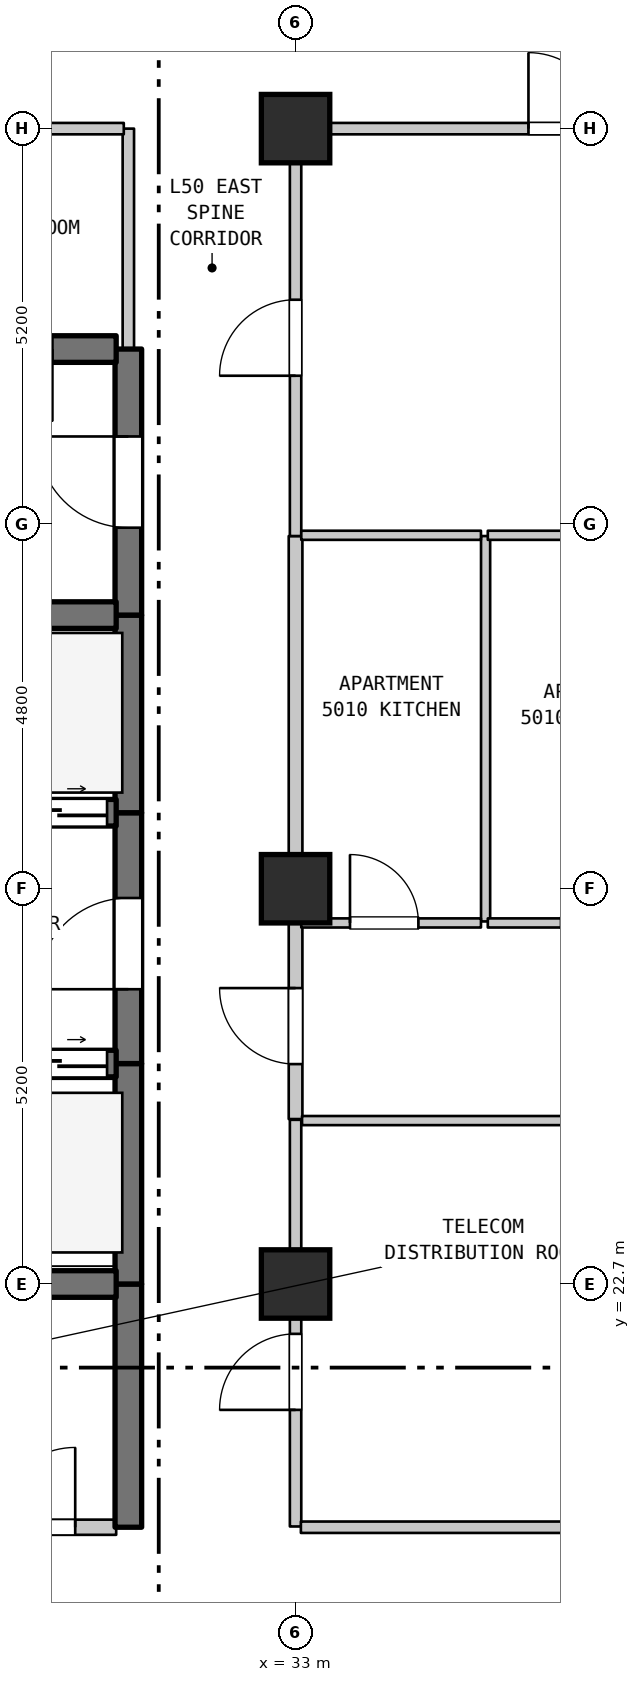
"""IFC4 building model, lengths in metres.
Left out: names, types, materials, properties, quantities, classifications, styles, units other than length and angle.
Written with IfcOpenShell. Run it as: python <this file> out.ifc"""

import sys

from ifc_helpers import new_model, si_unit, direction, frame, frame_2d, origin, origin_2d, place, context, subcontext, project, spatial, rectangle, extrude, element, fill, save


model = new_model("IFC4")
c1 = context("Model", 3, precision=1e-05, world=origin(), true_north=direction((0.0, 1.0)))
c2 = subcontext(c1, "Body", "Model", "MODEL_VIEW")
j1 = project(units=[si_unit("LENGTHUNIT", "METRE"), si_unit("PLANEANGLEUNIT", "RADIAN")], contexts=[c1])
p1 = place(None, origin())
s1 = spatial("IfcSite", under=j1, at=p1, CompositionType="ELEMENT")
p2 = place(p1, origin())
s2 = spatial("IfcBuilding", under=s1, at=p2, CompositionType="ELEMENT")
p3 = place(p2, frame((0.0, 0.0, 203.2)))
s3 = spatial("IfcBuildingStorey", under=s2, at=p3, CompositionType="ELEMENT", Elevation=203.2)
for number, where, z_axis, x_axis in (
    (1, (33.0, 22.7, 0.0), (0.0, 0.0, 1.0), (1.0, 0.0, 0.0)),
    (2, (33.0, 27.9, 0.0), (0.0, 0.0, 1.0), (1.0, 0.0, 0.0)),
    (3, (33.0, 37.9, 0.0), (0.0, 0.0, 1.0), (1.0, 0.0, 0.0)),
):
    element("IfcColumn", number, at=place(p3, frame(where, z_axis=z_axis, x_axis=x_axis)), inside=s3, PredefinedType="COLUMN", context=c2, shape_type="SweptSolid", body=[
        extrude(rectangle(XDim=0.9, YDim=0.9, at=origin_2d()), origin(), (0.0, 0.0, 1.0), 3.7),
    ])
p4 = place(p3, frame((30.8, 19.5, 0.0), z_axis=(0.0, 0.0, 1.0), x_axis=(0.0, 1.0, 0.0)))
e4 = element("IfcWall", 4, at=p4, inside=s3, PredefinedType="SHEAR", context=c2, shape_type="SweptSolid", body=[
    extrude(rectangle(XDim=3.2, YDim=0.35, at=frame_2d((1.6, 0.0))), origin(), (0.0, 0.0, 1.0), 3.39),
])
p5 = place(p3, frame((30.8, 22.7, 0.0), z_axis=(0.0, 0.0, 1.0), x_axis=(0.0, 1.0, 0.0)))
e5 = element("IfcWall", 5, at=p5, inside=s3, PredefinedType="SHEAR", context=c2, shape_type="SweptSolid", body=[
    extrude(rectangle(XDim=2.9, YDim=0.35, at=frame_2d((1.45, 0.0))), origin(), (0.0, 0.0, 1.0), 3.39),
])
p6 = place(p3, frame((30.8, 25.6, 0.0), z_axis=(0.0, 0.0, 1.0), x_axis=(0.0, 1.0, 0.0)))
e6 = element("IfcWall", 6, at=p6, inside=s3, PredefinedType="SHEAR", context=c2, shape_type="SweptSolid", body=[
    extrude(rectangle(XDim=3.3, YDim=0.35, at=frame_2d((1.65, 0.0))), origin(), (0.0, 0.0, 1.0), 3.39),
])
p7 = place(p6, frame((0.978, 0.0, 0.0)))
e7 = element("IfcOpeningElement", 7, at=p7, cuts=e6, PredefinedType="OPENING", context=c2, shape_type="SweptSolid", body=[
    extrude(rectangle(XDim=1.2, YDim=2.2, at=frame_2d((0.6, 1.1))), frame((0.0, 0.185, 0.0), z_axis=(0.0, -1.0, 0.0), x_axis=(1.0, 0.0, 0.0)), (0.0, 0.0, 1.0), 0.37),
])
p8 = place(p3, frame((30.8, 28.9, 0.0), z_axis=(0.0, 0.0, 1.0), x_axis=(0.0, 1.0, 0.0)))
e8 = element("IfcWall", 8, at=p8, inside=s3, PredefinedType="SHEAR", context=c2, shape_type="SweptSolid", body=[
    extrude(rectangle(XDim=2.6, YDim=0.35, at=frame_2d((1.3, 0.0))), origin(), (0.0, 0.0, 1.0), 3.39),
])
p9 = place(p3, frame((30.8, 31.5, 0.0), z_axis=(0.0, 0.0, 1.0), x_axis=(0.0, 1.0, 0.0)))
e9 = element("IfcWall", 9, at=p9, inside=s3, PredefinedType="SHEAR", context=c2, shape_type="SweptSolid", body=[
    extrude(rectangle(XDim=3.5, YDim=0.35, at=frame_2d((1.75, 0.0))), origin(), (0.0, 0.0, 1.0), 3.39),
])
p10 = place(p9, frame((1.15, 0.0, 0.0)))
e10 = element("IfcOpeningElement", 10, at=p10, cuts=e9, PredefinedType="OPENING", context=c2, shape_type="SweptSolid", body=[
    extrude(rectangle(XDim=1.2, YDim=2.2, at=frame_2d((0.6, 1.1))), frame((0.0, 0.185, 0.0), z_axis=(0.0, -1.0, 0.0), x_axis=(1.0, 0.0, 0.0)), (0.0, 0.0, 1.0), 0.37),
])
p11 = place(p3, frame((30.8, 35.0, 0.0), z_axis=(0.0, 0.0, 1.0), x_axis=(0.0, 1.0, 0.0)))
e11 = element("IfcWall", 11, at=p11, inside=s3, PredefinedType="STANDARD", context=c2, shape_type="SweptSolid", body=[
    extrude(rectangle(XDim=2.9, YDim=0.15, at=frame_2d((1.45, 0.0))), origin(), (0.0, 0.0, 1.0), 3.39),
])
p12 = place(p3, frame((33.0, 19.51, 0.0), z_axis=(0.0, 0.0, 1.0), x_axis=(0.0, 1.0, 0.0)))
e12 = element("IfcWall", 12, at=p12, inside=s3, PredefinedType="STANDARD", context=c2, shape_type="SweptSolid", body=[
    extrude(rectangle(XDim=5.35, YDim=0.15, at=frame_2d((2.675, 0.0))), origin(), (0.0, 0.0, 1.0), 2.99),
])
p13 = place(p12, frame((1.534, 0.0, 0.0)))
e13 = element("IfcOpeningElement", 13, at=p13, cuts=e12, PredefinedType="OPENING", context=c2, shape_type="SweptSolid", body=[
    extrude(rectangle(XDim=1.0, YDim=2.15, at=frame_2d((0.5, 1.075))), frame((0.0, 0.085, 0.0), z_axis=(0.0, -1.0, 0.0), x_axis=(1.0, 0.0, 0.0)), (0.0, 0.0, 1.0), 0.17),
])
p14 = place(p3, frame((33.0, 24.87, 0.0), z_axis=(0.0, 0.0, 1.0), x_axis=(0.0, 1.0, 0.0)))
e14 = element("IfcWall", 14, at=p14, inside=s3, PredefinedType="STANDARD", context=c2, shape_type="SweptSolid", body=[
    extrude(rectangle(XDim=2.6, YDim=0.18, at=frame_2d((1.3, 0.0))), origin(), (0.0, 0.0, 1.0), 2.99),
])
p15 = place(p14, frame((0.723, 0.0, 0.0)))
e15 = element("IfcOpeningElement", 15, at=p15, cuts=e14, PredefinedType="OPENING", context=c2, shape_type="SweptSolid", body=[
    extrude(rectangle(XDim=1.0, YDim=2.15, at=frame_2d((0.5, 1.075))), frame((0.0, 0.1, 0.0), z_axis=(0.0, -1.0, 0.0), x_axis=(1.0, 0.0, 0.0)), (0.0, 0.0, 1.0), 0.2),
])
p16 = place(p3, frame((33.0, 27.47, 0.0), z_axis=(0.0, 0.0, 1.0), x_axis=(0.0, 1.0, 0.0)))
e16 = element("IfcWall", 16, at=p16, inside=s3, PredefinedType="STANDARD", context=c2, shape_type="SweptSolid", body=[
    extrude(rectangle(XDim=5.07, YDim=0.18, at=frame_2d((2.535, 0.0))), origin(), (0.0, 0.0, 1.0), 2.89),
])
p17 = place(p3, frame((33.0, 32.54, 0.0), z_axis=(0.0, 0.0, 1.0), x_axis=(0.0, 1.0, 0.0)))
e17 = element("IfcWall", 17, at=p17, inside=s3, PredefinedType="STANDARD", context=c2, shape_type="SweptSolid", body=[
    extrude(rectangle(XDim=5.36, YDim=0.15, at=frame_2d((2.68, 0.0))), origin(), (0.0, 0.0, 1.0), 2.89),
])
p18 = place(p17, frame((2.109, 0.0, 0.0)))
e18 = element("IfcOpeningElement", 18, at=p18, cuts=e17, PredefinedType="OPENING", context=c2, shape_type="SweptSolid", body=[
    extrude(rectangle(XDim=1.0, YDim=2.15, at=frame_2d((0.5, 1.075))), frame((0.0, 0.085, 0.0), z_axis=(0.0, -1.0, 0.0), x_axis=(1.0, 0.0, 0.0)), (0.0, 0.0, 1.0), 0.17),
])
p19 = place(p3, frame((35.5, 27.47, 0.0), z_axis=(0.0, 0.0, 1.0), x_axis=(0.0, 1.0, 0.0)))
e19 = element("IfcWall", 19, at=p19, inside=s3, PredefinedType="PARTITIONING", context=c2, shape_type="SweptSolid", body=[
    extrude(rectangle(XDim=5.07, YDim=0.12, at=frame_2d((2.535, 0.0))), origin(), (0.0, 0.0, 1.0), 3.39),
])
p20 = place(p3, frame((28.585, 19.5, 0.0), z_axis=(0.0, 0.0, 1.0), x_axis=(1.0, 0.0, 0.0)))
e20 = element("IfcWall", 20, at=p20, inside=s3, PredefinedType="STANDARD", context=c2, shape_type="SweptSolid", body=[
    extrude(rectangle(XDim=2.055, YDim=0.2, at=frame_2d((1.027, 0.0))), origin(), (0.0, 0.0, 1.0), 3.39),
])
p21 = place(p20, frame((0.466, 0.0, 0.0)))
e21 = element("IfcOpeningElement", 21, at=p21, cuts=e20, PredefinedType="OPENING", context=c2, shape_type="SweptSolid", body=[
    extrude(rectangle(XDim=1.05, YDim=2.15, at=frame_2d((0.525, 1.075))), frame((0.0, 0.11, 0.0), z_axis=(0.0, -1.0, 0.0), x_axis=(1.0, 0.0, 0.0)), (0.0, 0.0, 1.0), 0.22),
])
p22 = place(p3, frame((33.07, 19.5, 0.0), z_axis=(0.0, 0.0, 1.0), x_axis=(1.0, 0.0, 0.0)))
e22 = element("IfcWall", 22, at=p22, inside=s3, PredefinedType="STANDARD", context=c2, shape_type="SweptSolid", body=[
    extrude(rectangle(XDim=21.51, YDim=0.15, at=frame_2d((10.755, 0.0))), origin(), (0.0, 0.0, 1.0), 3.39),
])
p23 = place(p22, frame((10.185, 0.0, 0.0)))
e23 = element("IfcOpeningElement", 23, at=p23, cuts=e22, PredefinedType="OPENING", context=c2, shape_type="SweptSolid", body=[
    extrude(rectangle(XDim=1.0, YDim=2.15, at=frame_2d((0.5, 1.075))), frame((0.0, 0.085, 0.0), z_axis=(0.0, -1.0, 0.0), x_axis=(1.0, 0.0, 0.0)), (0.0, 0.0, 1.0), 0.17),
])
p24 = place(p3, frame((28.585, 22.7, 0.0), z_axis=(0.0, 0.0, 1.0), x_axis=(1.0, 0.0, 0.0)))
e24 = element("IfcWall", 24, at=p24, inside=s3, PredefinedType="SHEAR", context=c2, shape_type="SweptSolid", body=[
    extrude(rectangle(XDim=2.055, YDim=0.35, at=frame_2d((1.027, 0.0))), origin(), (0.0, 0.0, 1.0), 3.39),
])
p25 = place(p3, frame((33.085, 24.85, 0.0), z_axis=(0.0, 0.0, 1.0), x_axis=(1.0, 0.0, 0.0)))
e25 = element("IfcWall", 25, at=p25, inside=s3, PredefinedType="PARTITIONING", context=c2, shape_type="SweptSolid", body=[
    extrude(rectangle(XDim=23.905, YDim=0.12, at=frame_2d((11.953, 0.0))), origin(), (0.0, 0.0, 1.0), 3.39),
])
p26 = place(p3, frame((27.46, 25.6, 0.0), z_axis=(0.0, 0.0, 1.0), x_axis=(1.0, 0.0, 0.0)))
e26 = element("IfcWall", 26, at=p26, inside=s3, PredefinedType="SHEAR", context=c2, shape_type="SweptSolid", body=[
    extrude(rectangle(XDim=3.18, YDim=0.35, at=frame_2d((1.59, 0.0))), origin(), (0.0, 0.0, 1.0), 3.39),
])
p27 = place(p26, frame((0.12, 0.0, 0.0)))
e27 = element("IfcOpeningElement", 27, at=p27, cuts=e26, PredefinedType="OPENING", context=c2, shape_type="SweptSolid", body=[
    extrude(rectangle(XDim=1.25, YDim=2.2, at=frame_2d((0.625, 1.1))), frame((0.0, 0.185, 0.0), z_axis=(0.0, -1.0, 0.0), x_axis=(1.0, 0.0, 0.0)), (0.0, 0.0, 1.0), 0.37),
])
p28 = place(p26, frame((1.81, 0.0, 0.0)))
e28 = element("IfcOpeningElement", 28, at=p28, cuts=e26, PredefinedType="OPENING", context=c2, shape_type="SweptSolid", body=[
    extrude(rectangle(XDim=1.25, YDim=2.2, at=frame_2d((0.625, 1.1))), frame((0.0, 0.185, 0.0), z_axis=(0.0, -1.0, 0.0), x_axis=(1.0, 0.0, 0.0)), (0.0, 0.0, 1.0), 0.37),
])
p29 = place(p3, frame((33.075, 27.45, 0.0), z_axis=(0.0, 0.0, 1.0), x_axis=(1.0, 0.0, 0.0)))
e29 = element("IfcWall", 29, at=p29, inside=s3, PredefinedType="PARTITIONING", context=c2, shape_type="SweptSolid", body=[
    extrude(rectangle(XDim=2.364, YDim=0.12, at=frame_2d((1.182, 0.0))), origin(), (0.0, 0.0, 1.0), 3.39),
])
p30 = place(p29, frame((0.641, 0.0, 0.0)))
e30 = element("IfcOpeningElement", 30, at=p30, cuts=e29, PredefinedType="OPENING", context=c2, shape_type="SweptSolid", body=[
    extrude(rectangle(XDim=0.9, YDim=2.15, at=frame_2d((0.45, 1.075))), frame((0.0, 0.07, 0.0), z_axis=(0.0, -1.0, 0.0), x_axis=(1.0, 0.0, 0.0)), (0.0, 0.0, 1.0), 0.14),
])
p31 = place(p3, frame((35.529, 27.45, 0.0), z_axis=(0.0, 0.0, 1.0), x_axis=(1.0, 0.0, 0.0)))
e31 = element("IfcWall", 31, at=p31, inside=s3, PredefinedType="PARTITIONING", context=c2, shape_type="SweptSolid", body=[
    extrude(rectangle(XDim=2.826, YDim=0.12, at=frame_2d((1.413, 0.0))), origin(), (0.0, 0.0, 1.0), 3.39),
])
p32 = place(p31, frame((0.963, 0.0, 0.0)))
e32 = element("IfcOpeningElement", 32, at=p32, cuts=e31, PredefinedType="OPENING", context=c2, shape_type="SweptSolid", body=[
    extrude(rectangle(XDim=0.9, YDim=2.1, at=frame_2d((0.45, 1.05))), frame((0.0, 0.07, 0.0), z_axis=(0.0, -1.0, 0.0), x_axis=(1.0, 0.0, 0.0)), (0.0, 0.0, 1.0), 0.14),
])
p33 = place(p3, frame((27.46, 28.9, 0.0), z_axis=(0.0, 0.0, 1.0), x_axis=(1.0, 0.0, 0.0)))
e33 = element("IfcWall", 33, at=p33, inside=s3, PredefinedType="SHEAR", context=c2, shape_type="SweptSolid", body=[
    extrude(rectangle(XDim=3.18, YDim=0.35, at=frame_2d((1.59, 0.0))), origin(), (0.0, 0.0, 1.0), 3.39),
])
p34 = place(p33, frame((0.12, 0.0, 0.0)))
e34 = element("IfcOpeningElement", 34, at=p34, cuts=e33, PredefinedType="OPENING", context=c2, shape_type="SweptSolid", body=[
    extrude(rectangle(XDim=1.25, YDim=2.2, at=frame_2d((0.625, 1.1))), frame((0.0, 0.185, 0.0), z_axis=(0.0, -1.0, 0.0), x_axis=(1.0, 0.0, 0.0)), (0.0, 0.0, 1.0), 0.37),
])
p35 = place(p33, frame((1.81, 0.0, 0.0)))
e35 = element("IfcOpeningElement", 35, at=p35, cuts=e33, PredefinedType="OPENING", context=c2, shape_type="SweptSolid", body=[
    extrude(rectangle(XDim=1.25, YDim=2.2, at=frame_2d((0.625, 1.1))), frame((0.0, 0.185, 0.0), z_axis=(0.0, -1.0, 0.0), x_axis=(1.0, 0.0, 0.0)), (0.0, 0.0, 1.0), 0.37),
])
p36 = place(p3, frame((27.46, 31.5, 0.0), z_axis=(0.0, 0.0, 1.0), x_axis=(1.0, 0.0, 0.0)))
e36 = element("IfcWall", 36, at=p36, inside=s3, PredefinedType="SHEAR", context=c2, shape_type="SweptSolid", body=[
    extrude(rectangle(XDim=3.18, YDim=0.35, at=frame_2d((1.59, 0.0))), origin(), (0.0, 0.0, 1.0), 3.39),
])
p37 = place(p3, frame((33.075, 32.55, 0.0), z_axis=(0.0, 0.0, 1.0), x_axis=(1.0, 0.0, 0.0)))
e37 = element("IfcWall", 37, at=p37, inside=s3, PredefinedType="PARTITIONING", context=c2, shape_type="SweptSolid", body=[
    extrude(rectangle(XDim=2.364, YDim=0.12, at=frame_2d((1.182, 0.0))), origin(), (0.0, 0.0, 1.0), 3.39),
])
p38 = place(p3, frame((35.529, 32.55, 0.0), z_axis=(0.0, 0.0, 1.0), x_axis=(1.0, 0.0, 0.0)))
e38 = element("IfcWall", 38, at=p38, inside=s3, PredefinedType="PARTITIONING", context=c2, shape_type="SweptSolid", body=[
    extrude(rectangle(XDim=2.826, YDim=0.12, at=frame_2d((1.413, 0.0))), origin(), (0.0, 0.0, 1.0), 3.39),
])
p39 = place(p3, frame((28.045, 35.0, 0.0), z_axis=(0.0, 0.0, 1.0), x_axis=(1.0, 0.0, 0.0)))
e39 = element("IfcWall", 39, at=p39, inside=s3, PredefinedType="SHEAR", context=c2, shape_type="SweptSolid", body=[
    extrude(rectangle(XDim=2.595, YDim=0.35, at=frame_2d((1.297, 0.0))), origin(), (0.0, 0.0, 1.0), 3.39),
])
p40 = place(p39, frame((0.806, 0.0, 0.0)))
e40 = element("IfcOpeningElement", 40, at=p40, cuts=e39, PredefinedType="OPENING", context=c2, shape_type="SweptSolid", body=[
    extrude(rectangle(XDim=0.95, YDim=2.15, at=frame_2d((0.475, 1.075))), frame((0.0, 0.185, 0.0), z_axis=(0.0, -1.0, 0.0), x_axis=(1.0, 0.0, 0.0)), (0.0, 0.0, 1.0), 0.37),
])
p41 = place(p3, frame((28.045, 37.9, 0.0), z_axis=(0.0, 0.0, 1.0), x_axis=(1.0, 0.0, 0.0)))
e41 = element("IfcWall", 41, at=p41, inside=s3, PredefinedType="STANDARD", context=c2, shape_type="SweptSolid", body=[
    extrude(rectangle(XDim=2.695, YDim=0.15, at=frame_2d((1.348, 0.0))), origin(), (0.0, 0.0, 1.0), 2.89),
])
p42 = place(p3, frame((33.06, 37.9, 0.0), z_axis=(0.0, 0.0, 1.0), x_axis=(1.0, 0.0, 0.0)))
e42 = element("IfcWall", 42, at=p42, inside=s3, PredefinedType="STANDARD", context=c2, shape_type="SweptSolid", body=[
    extrude(rectangle(XDim=7.164, YDim=0.15, at=frame_2d((3.582, 0.0))), origin(), (0.0, 0.0, 1.0), 3.39),
])
p43 = place(p42, frame((3.004, 0.0, 0.0)))
e43 = element("IfcOpeningElement", 43, at=p43, cuts=e42, PredefinedType="OPENING", context=c2, shape_type="SweptSolid", body=[
    extrude(rectangle(XDim=1.0, YDim=2.15, at=frame_2d((0.5, 1.075))), frame((0.0, 0.085, 0.0), z_axis=(0.0, -1.0, 0.0), x_axis=(1.0, 0.0, 0.0)), (0.0, 0.0, 1.0), 0.17),
])
p44 = place(p7, origin())
e44 = element("IfcDoor", 44, at=p44, inside=s3, OperationType="SINGLE_SWING_LEFT", PredefinedType="DOOR", context=c2, shape_type="SweptSolid", body=[
    extrude(rectangle(XDim=1.2, YDim=2.2, at=frame_2d((0.6, 1.1))), frame((0.0, 0.025, 0.0), z_axis=(0.0, -1.0, 0.0), x_axis=(1.0, 0.0, 0.0)), (0.0, 0.0, 1.0), 0.05),
])
fill(e7, e44)
p45 = place(p10, origin())
e45 = element("IfcDoor", 45, at=p45, inside=s3, OperationType="SINGLE_SWING_RIGHT", PredefinedType="DOOR", context=c2, shape_type="SweptSolid", body=[
    extrude(rectangle(XDim=1.2, YDim=2.2, at=frame_2d((0.6, 1.1))), frame((0.0, 0.025, 0.0), z_axis=(0.0, -1.0, 0.0), x_axis=(1.0, 0.0, 0.0)), (0.0, 0.0, 1.0), 0.05),
])
fill(e10, e45)
p46 = place(p13, origin())
e46 = element("IfcDoor", 46, at=p46, inside=s3, OperationType="SINGLE_SWING_LEFT", PredefinedType="DOOR", context=c2, shape_type="SweptSolid", body=[
    extrude(rectangle(XDim=1.0, YDim=2.15, at=frame_2d((0.5, 1.075))), frame((0.0, 0.025, 0.0), z_axis=(0.0, -1.0, 0.0), x_axis=(1.0, 0.0, 0.0)), (0.0, 0.0, 1.0), 0.05),
])
fill(e13, e46)
p47 = place(p15, origin())
e47 = element("IfcDoor", 47, at=p47, inside=s3, OperationType="SINGLE_SWING_RIGHT", PredefinedType="DOOR", context=c2, shape_type="SweptSolid", body=[
    extrude(rectangle(XDim=1.0, YDim=2.15, at=frame_2d((0.5, 1.075))), frame((0.0, 0.025, 0.0), z_axis=(0.0, -1.0, 0.0), x_axis=(1.0, 0.0, 0.0)), (0.0, 0.0, 1.0), 0.05),
])
fill(e15, e47)
p48 = place(p18, origin())
e48 = element("IfcDoor", 48, at=p48, inside=s3, OperationType="SINGLE_SWING_LEFT", PredefinedType="DOOR", context=c2, shape_type="SweptSolid", body=[
    extrude(rectangle(XDim=1.0, YDim=2.15, at=frame_2d((0.5, 1.075))), frame((0.0, 0.025, 0.0), z_axis=(0.0, -1.0, 0.0), x_axis=(1.0, 0.0, 0.0)), (0.0, 0.0, 1.0), 0.05),
])
fill(e18, e48)
p49 = place(p21, origin())
e49 = element("IfcDoor", 49, at=p49, inside=s3, OperationType="SINGLE_SWING_RIGHT", PredefinedType="DOOR", context=c2, shape_type="SweptSolid", body=[
    extrude(rectangle(XDim=1.05, YDim=2.15, at=frame_2d((0.525, 1.075))), frame((0.0, 0.025, 0.0), z_axis=(0.0, -1.0, 0.0), x_axis=(1.0, 0.0, 0.0)), (0.0, 0.0, 1.0), 0.05),
])
fill(e21, e49)
p50 = place(p28, origin())
e50 = element("IfcDoor", 50, at=p50, inside=s3, OperationType="DOUBLE_DOOR_SLIDING", PredefinedType="DOOR", context=c2, shape_type="SweptSolid", body=[
    extrude(rectangle(XDim=1.25, YDim=2.2, at=frame_2d((0.625, 1.1))), frame((0.0, 0.025, 0.0), z_axis=(0.0, -1.0, 0.0), x_axis=(1.0, 0.0, 0.0)), (0.0, 0.0, 1.0), 0.05),
])
fill(e28, e50)
p51 = place(p30, origin())
e51 = element("IfcDoor", 51, at=p51, inside=s3, OperationType="SINGLE_SWING_LEFT", PredefinedType="DOOR", context=c2, shape_type="SweptSolid", body=[
    extrude(rectangle(XDim=0.9, YDim=2.15, at=frame_2d((0.45, 1.075))), frame((0.0, 0.025, 0.0), z_axis=(0.0, -1.0, 0.0), x_axis=(1.0, 0.0, 0.0)), (0.0, 0.0, 1.0), 0.05),
])
fill(e30, e51)
p52 = place(p35, origin())
e52 = element("IfcDoor", 52, at=p52, inside=s3, OperationType="DOUBLE_DOOR_SLIDING", PredefinedType="DOOR", context=c2, shape_type="SweptSolid", body=[
    extrude(rectangle(XDim=1.25, YDim=2.2, at=frame_2d((0.625, 1.1))), frame((0.0, 0.025, 0.0), z_axis=(0.0, -1.0, 0.0), x_axis=(1.0, 0.0, 0.0)), (0.0, 0.0, 1.0), 0.05),
])
fill(e35, e52)
p53 = place(p40, frame((0.95, 0.0, 0.0), z_axis=(0.0, 0.0, 1.0), x_axis=(-1.0, 0.0, 0.0)))
e53 = element("IfcDoor", 53, at=p53, inside=s3, OperationType="SINGLE_SWING_RIGHT", PredefinedType="DOOR", context=c2, shape_type="SweptSolid", body=[
    extrude(rectangle(XDim=0.95, YDim=2.15, at=frame_2d((0.475, 1.075))), frame((0.0, 0.025, 0.0), z_axis=(0.0, -1.0, 0.0), x_axis=(1.0, 0.0, 0.0)), (0.0, 0.0, 1.0), 0.05),
])
fill(e40, e53)
p54 = place(p43, origin())
e54 = element("IfcDoor", 54, at=p54, inside=s3, OperationType="SINGLE_SWING_LEFT", PredefinedType="DOOR", context=c2, shape_type="SweptSolid", body=[
    extrude(rectangle(XDim=1.0, YDim=2.15, at=frame_2d((0.5, 1.075))), frame((0.0, 0.025, 0.0), z_axis=(0.0, -1.0, 0.0), x_axis=(1.0, 0.0, 0.0)), (0.0, 0.0, 1.0), 0.05),
])
fill(e43, e54)
save(model, sys.argv[1])
